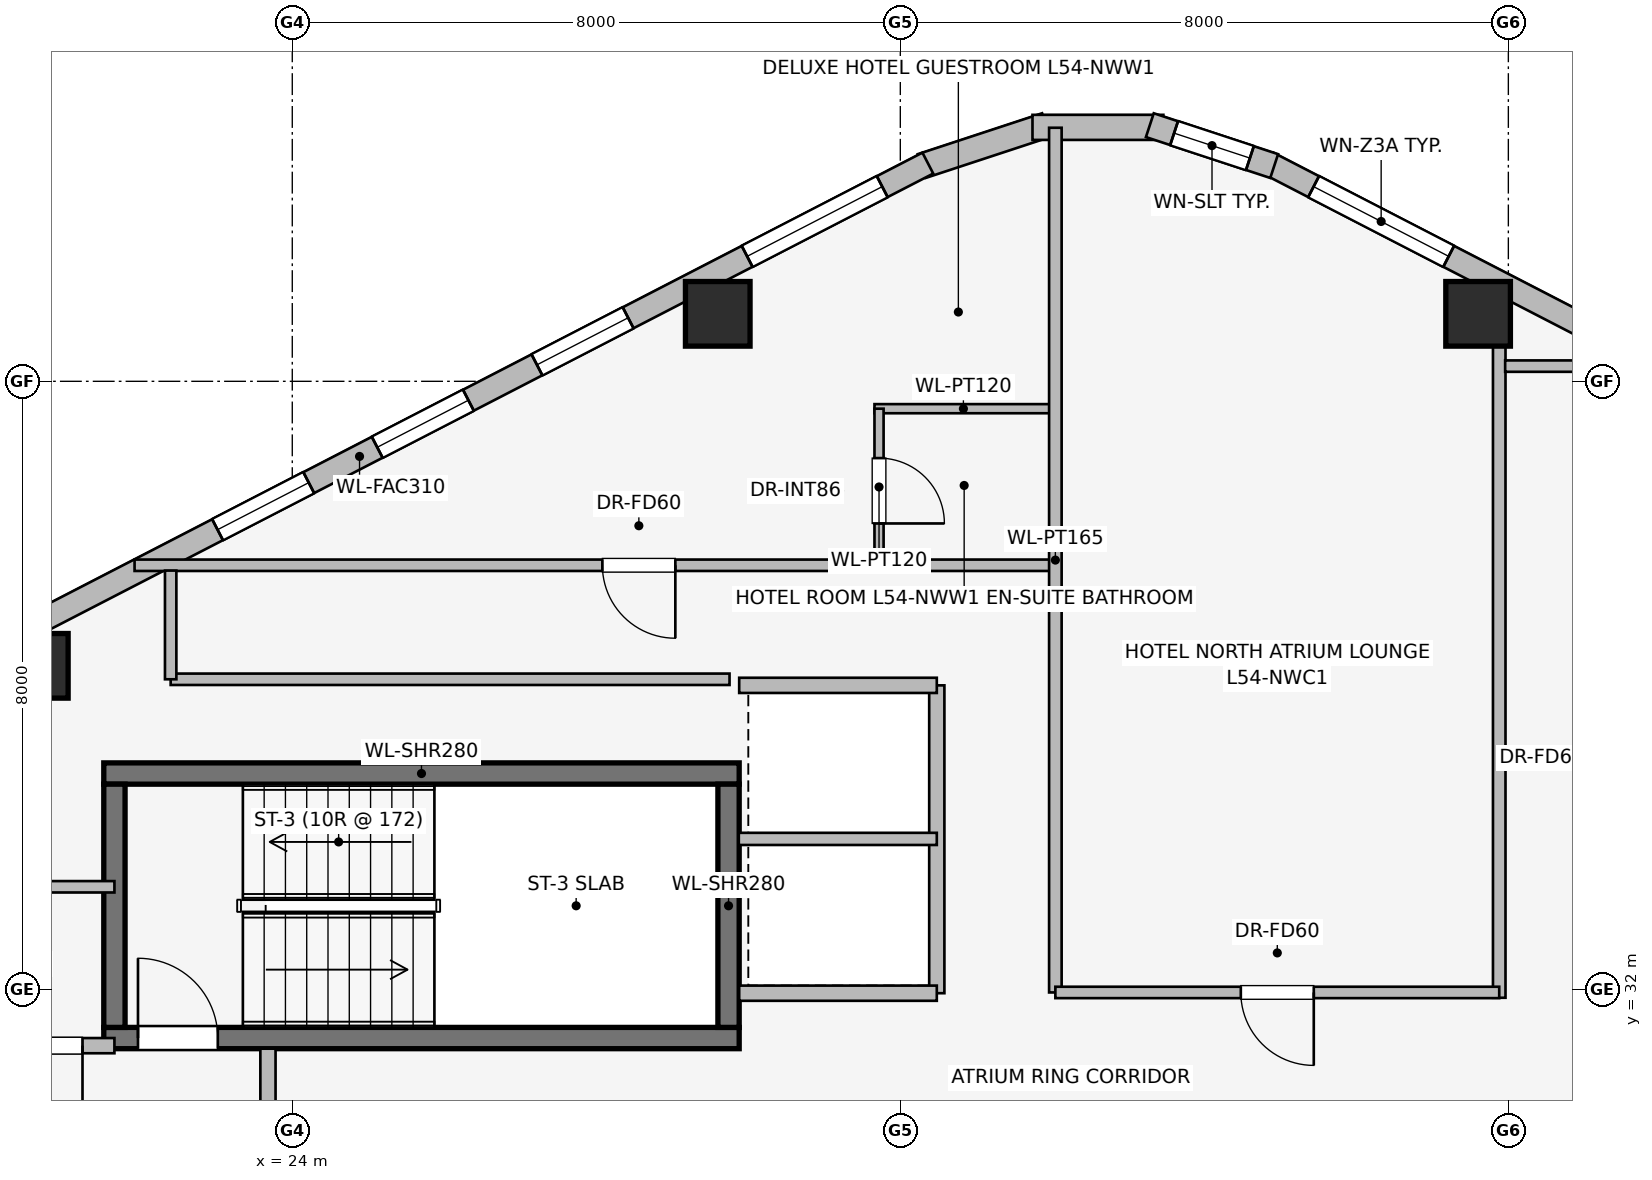
"""IFC4 building model, lengths in metres.
Left out: names, types, materials, properties, quantities, classifications, styles, units other than length and angle.
Written with IfcOpenShell. Run it as: python <this file> out.ifc"""

import sys

from ifc_helpers import new_model, si_unit, direction, frame, frame_2d, origin, origin_2d, place, context, subcontext, project, spatial, rectangle, extrude, element, fill, save


model = new_model("IFC4")
c1 = context("Model", 3, precision=1e-05, world=origin(), true_north=direction((0.0, 1.0)))
c2 = subcontext(c1, "Body", "Model", "MODEL_VIEW")
j1 = project(units=[si_unit("LENGTHUNIT", "METRE"), si_unit("PLANEANGLEUNIT", "RADIAN")], contexts=[c1])
p1 = place(None, origin())
s1 = spatial("IfcSite", under=j1, at=p1, CompositionType="ELEMENT")
p2 = place(p1, origin())
s2 = spatial("IfcBuilding", under=s1, at=p2, CompositionType="ELEMENT")
p3 = place(p2, frame((0.0, 0.0, 199.9)))
s3 = spatial("IfcBuildingStorey", under=s2, at=p3, CompositionType="ELEMENT", Elevation=199.9)
p4 = place(p3, frame((21.52, 31.36, 0.0), z_axis=(0.0, 0.0, 1.0), x_axis=(1.0, 0.0, 0.0)))
e1 = element("IfcWall", 1, at=p4, inside=s3, PredefinedType="SHEAR", context=c2, shape_type="SweptSolid", body=[
    extrude(rectangle(XDim=8.36, YDim=0.28, at=frame_2d((4.18, 0.0))), origin(), (0.0, 0.0, 1.0), 3.45),
])
p5 = place(p4, frame((0.45, 0.0, 0.0)))
e2 = element("IfcOpeningElement", 2, at=p5, cuts=e1, PredefinedType="OPENING", context=c2, shape_type="SweptSolid", body=[
    extrude(rectangle(XDim=1.05, YDim=2.0, at=frame_2d((0.525, 1.0))), frame((0.0, 0.15, 0.0), z_axis=(0.0, -1.0, 0.0), x_axis=(1.0, 0.0, 0.0)), (0.0, 0.0, 1.0), 0.3),
])
p6 = place(p3, frame((29.88, 34.84, 0.0), z_axis=(0.0, 0.0, 1.0), x_axis=(-1.0, 0.0, 0.0)))
e3 = element("IfcWall", 3, at=p6, inside=s3, PredefinedType="SHEAR", context=c2, shape_type="SweptSolid", body=[
    extrude(rectangle(XDim=8.36, YDim=0.28, at=frame_2d((4.18, 0.0))), origin(), (0.0, 0.0, 1.0), 3.45),
])
for number, where, z_axis, x_axis in (
    (4, (21.66, 34.7, 0.0), (0.0, 0.0, 1.0), (0.0, -1.0, 0.0)),
    (5, (29.74, 31.5, 0.0), (0.0, 0.0, 1.0), (0.0, 1.0, 0.0)),
):
    element("IfcWall", number, at=place(p3, frame(where, z_axis=z_axis, x_axis=x_axis)), inside=s3, PredefinedType="SHEAR", context=c2, shape_type="SweptSolid", body=[
        extrude(rectangle(XDim=3.2, YDim=0.28, at=frame_2d((1.6, 0.0))), origin(), (0.0, 0.0, 1.0), 3.45),
    ])
for number, where, z_axis, x_axis in (
    (6, (39.602, 40.888, 0.0), (0.0, 0.0, 1.0), (1.0, 0.0, 0.0)),
    (7, (29.598, 40.888, 0.0), (0.0, 0.0, 1.0), (1.0, 0.0, 0.0)),
    (8, (20.626, 36.257, 0.0), (0.0, 0.0, 1.0), (1.0, 0.0, 0.0)),
):
    element("IfcColumn", number, at=place(p3, frame(where, z_axis=z_axis, x_axis=x_axis)), inside=s3, PredefinedType="COLUMN", context=c2, shape_type="SweptSolid", body=[
        extrude(rectangle(XDim=0.85, YDim=0.85, at=origin_2d()), origin(), (0.0, 0.0, 1.0), 3.45),
    ])
p7 = place(p3, frame((36.838, 42.871, 0.0), z_axis=(0.0, 0.0, 1.0), x_axis=(0.888626188278, -0.458632202867, 0.0)))
e9 = element("IfcWall", 9, at=p7, inside=s3, PredefinedType="STANDARD", context=c2, shape_type="SweptSolid", body=[
    extrude(rectangle(XDim=16.828, YDim=0.31, at=frame_2d((8.414, 0.0))), origin(), (0.0, 0.0, 1.0), 3.19),
])
p8 = place(p7, frame((0.675, 0.0, 0.75)))
e10 = element("IfcOpeningElement", 10, at=p8, cuts=e9, PredefinedType="OPENING", context=c2, shape_type="SweptSolid", body=[
    extrude(rectangle(XDim=2.0, YDim=1.5, at=frame_2d((1.0, 0.75))), frame((0.0, 0.165, 0.0), z_axis=(0.0, -1.0, 0.0), x_axis=(1.0, 0.0, 0.0)), (0.0, 0.0, 1.0), 0.33),
])
p9 = place(p7, frame((6.273, 0.0, 0.75)))
e11 = element("IfcOpeningElement", 11, at=p9, cuts=e9, PredefinedType="OPENING", context=c2, shape_type="SweptSolid", body=[
    extrude(rectangle(XDim=1.35, YDim=1.45, at=frame_2d((0.675, 0.725))), frame((0.0, 0.165, 0.0), z_axis=(0.0, -1.0, 0.0), x_axis=(1.0, 0.0, 0.0)), (0.0, 0.0, 1.0), 0.33),
])
p10 = place(p7, frame((8.653, 0.0, 0.75)))
e12 = element("IfcOpeningElement", 12, at=p10, cuts=e9, PredefinedType="OPENING", context=c2, shape_type="SweptSolid", body=[
    extrude(rectangle(XDim=1.35, YDim=1.45, at=frame_2d((0.675, 0.725))), frame((0.0, 0.165, 0.0), z_axis=(0.0, -1.0, 0.0), x_axis=(1.0, 0.0, 0.0)), (0.0, 0.0, 1.0), 0.33),
])
p11 = place(p7, frame((11.032, 0.0, 0.75)))
e13 = element("IfcOpeningElement", 13, at=p11, cuts=e9, PredefinedType="OPENING", context=c2, shape_type="SweptSolid", body=[
    extrude(rectangle(XDim=1.35, YDim=1.45, at=frame_2d((0.675, 0.725))), frame((0.0, 0.165, 0.0), z_axis=(0.0, -1.0, 0.0), x_axis=(1.0, 0.0, 0.0)), (0.0, 0.0, 1.0), 0.33),
])
p12 = place(p7, frame((14.153, 0.0, 0.75)))
e14 = element("IfcOpeningElement", 14, at=p12, cuts=e9, PredefinedType="OPENING", context=c2, shape_type="SweptSolid", body=[
    extrude(rectangle(XDim=2.0, YDim=1.5, at=frame_2d((1.0, 0.75))), frame((0.0, 0.165, 0.0), z_axis=(0.0, -1.0, 0.0), x_axis=(1.0, 0.0, 0.0)), (0.0, 0.0, 1.0), 0.33),
])
p13 = place(p3, frame((32.281, 42.832, 0.0), z_axis=(0.0, 0.0, 1.0), x_axis=(0.949937416267, 0.312440242569, 0.0)))
e15 = element("IfcWall", 15, at=p13, inside=s3, PredefinedType="STANDARD", context=c2, shape_type="SweptSolid", body=[
    extrude(rectangle(XDim=1.722, YDim=0.33, at=frame_2d((0.861, 0.0))), origin(), (0.0, 0.0, 1.0), 3.19),
])
p14 = place(p3, frame((33.739, 43.341, 0.0), z_axis=(0.0, 0.0, 1.0), x_axis=(1.0, 0.0, 0.0)))
e16 = element("IfcWall", 16, at=p14, inside=s3, PredefinedType="STANDARD", context=c2, shape_type="SweptSolid", body=[
    extrude(rectangle(XDim=1.722, YDim=0.33, at=frame_2d((0.861, 0.0))), origin(), (0.0, 0.0, 1.0), 3.19),
])
p15 = place(p3, frame((35.283, 43.37, 0.0), z_axis=(0.0, 0.0, 1.0), x_axis=(0.949937416267, -0.312440242569, 0.0)))
e17 = element("IfcWall", 17, at=p15, inside=s3, PredefinedType="STANDARD", context=c2, shape_type="SweptSolid", body=[
    extrude(rectangle(XDim=1.722, YDim=0.33, at=frame_2d((0.861, 0.0))), origin(), (0.0, 0.0, 1.0), 3.19),
])
p16 = place(p15, frame((0.336, 0.0, 0.75)))
e18 = element("IfcOpeningElement", 18, at=p16, cuts=e17, PredefinedType="OPENING", context=c2, shape_type="SweptSolid", body=[
    extrude(rectangle(XDim=1.05, YDim=1.4, at=frame_2d((0.525, 0.7))), frame((0.0, 0.175, 0.0), z_axis=(0.0, -1.0, 0.0), x_axis=(1.0, 0.0, 0.0)), (0.0, 0.0, 1.0), 0.35),
])
p17 = place(p3, frame((17.408, 35.153, 0.0), z_axis=(0.0, 0.0, 1.0), x_axis=(0.888626188278, 0.458632202867, 0.0)))
e19 = element("IfcWall", 19, at=p17, inside=s3, PredefinedType="STANDARD", context=c2, shape_type="SweptSolid", body=[
    extrude(rectangle(XDim=16.828, YDim=0.31, at=frame_2d((8.414, 0.0))), origin(), (0.0, 0.0, 1.0), 2.494),
])
p18 = place(p17, frame((0.675, 0.0, 0.75)))
e20 = element("IfcOpeningElement", 20, at=p18, cuts=e19, PredefinedType="OPENING", context=c2, shape_type="SweptSolid", body=[
    extrude(rectangle(XDim=2.0, YDim=1.5, at=frame_2d((1.0, 0.75))), frame((0.0, 0.165, 0.0), z_axis=(0.0, -1.0, 0.0), x_axis=(1.0, 0.0, 0.0)), (0.0, 0.0, 1.0), 0.33),
])
p19 = place(p17, frame((6.312, 0.0, 0.75)))
e21 = element("IfcOpeningElement", 21, at=p19, cuts=e19, PredefinedType="OPENING", context=c2, shape_type="SweptSolid", body=[
    extrude(rectangle(XDim=1.35, YDim=1.45, at=frame_2d((0.675, 0.725))), frame((0.0, 0.165, 0.0), z_axis=(0.0, -1.0, 0.0), x_axis=(1.0, 0.0, 0.0)), (0.0, 0.0, 1.0), 0.33),
])
p20 = place(p17, frame((8.676, 0.0, 0.75)))
e22 = element("IfcOpeningElement", 22, at=p20, cuts=e19, PredefinedType="OPENING", context=c2, shape_type="SweptSolid", body=[
    extrude(rectangle(XDim=1.35, YDim=1.45, at=frame_2d((0.675, 0.725))), frame((0.0, 0.165, 0.0), z_axis=(0.0, -1.0, 0.0), x_axis=(1.0, 0.0, 0.0)), (0.0, 0.0, 1.0), 0.33),
])
p21 = place(p17, frame((11.041, 0.0, 0.75)))
e23 = element("IfcOpeningElement", 23, at=p21, cuts=e19, PredefinedType="OPENING", context=c2, shape_type="SweptSolid", body=[
    extrude(rectangle(XDim=1.35, YDim=1.45, at=frame_2d((0.675, 0.725))), frame((0.0, 0.165, 0.0), z_axis=(0.0, -1.0, 0.0), x_axis=(1.0, 0.0, 0.0)), (0.0, 0.0, 1.0), 0.33),
])
p22 = place(p17, frame((14.153, 0.0, 0.75)))
e24 = element("IfcOpeningElement", 24, at=p22, cuts=e19, PredefinedType="OPENING", context=c2, shape_type="SweptSolid", body=[
    extrude(rectangle(XDim=2.0, YDim=1.5, at=frame_2d((1.0, 0.75))), frame((0.0, 0.165, 0.0), z_axis=(0.0, -1.0, 0.0), x_axis=(1.0, 0.0, 0.0)), (0.0, 0.0, 1.0), 0.33),
])
p23 = place(p3, frame((23.68, 25.68, 0.0), z_axis=(0.0, 0.0, 1.0), x_axis=(0.0, 1.0, 0.0)))
e25 = element("IfcWall", 25, at=p23, inside=s3, PredefinedType="PARTITIONING", context=c2, shape_type="SweptSolid", body=[
    extrude(rectangle(XDim=5.54, YDim=0.2, at=frame_2d((2.77, 0.0))), origin(), (0.0, 0.0, 1.0), 3.19),
])
p24 = place(p23, frame((1.8, 0.0, 0.0)))
e26 = element("IfcOpeningElement", 26, at=p24, cuts=e25, PredefinedType="OPENING", context=c2, shape_type="SweptSolid", body=[
    extrude(rectangle(XDim=1.05, YDim=2.0, at=frame_2d((0.525, 1.0))), frame((0.0, 0.11, 0.0), z_axis=(0.0, -1.0, 0.0), x_axis=(1.0, 0.0, 0.0)), (0.0, 0.0, 1.0), 0.22),
])
p25 = place(p3, frame((21.66, 31.26, 0.0), z_axis=(0.0, 0.0, 1.0), x_axis=(-1.0, 0.0, 0.0)))
e27 = element("IfcWall", 27, at=p25, inside=s3, PredefinedType="PARTITIONING", context=c2, shape_type="SweptSolid", body=[
    extrude(rectangle(XDim=2.01, YDim=0.2, at=frame_2d((1.005, 0.0))), origin(), (0.0, 0.0, 1.0), 3.19),
])
p26 = place(p25, frame((0.42, 0.0, 0.0)))
e28 = element("IfcOpeningElement", 28, at=p26, cuts=e27, PredefinedType="OPENING", context=c2, shape_type="SweptSolid", body=[
    extrude(rectangle(XDim=0.86, YDim=2.0, at=frame_2d((0.43, 1.0))), frame((0.0, 0.11, 0.0), z_axis=(0.0, -1.0, 0.0), x_axis=(1.0, 0.0, 0.0)), (0.0, 0.0, 1.0), 0.22),
])
p27 = place(p3, frame((32.48, 31.95, 0.0), z_axis=(0.0, 0.0, 1.0), x_axis=(0.0, 1.0, 0.0)))
e29 = element("IfcWall", 29, at=p27, inside=s3, PredefinedType="PARTITIONING", context=c2, shape_type="SweptSolid", body=[
    extrude(rectangle(XDim=4.05, YDim=0.2, at=frame_2d((2.025, 0.0))), origin(), (0.0, 0.0, 1.0), 3.19),
])
for number, where, z_axis, x_axis in (
    (30, (29.88, 36.0, 0.0), (0.0, 0.0, 1.0), (1.0, 0.0, 0.0)),
    (31, (32.48, 31.95, 0.0), (0.0, 0.0, 1.0), (-1.0, 0.0, 0.0)),
):
    element("IfcWall", number, at=place(p3, frame(where, z_axis=z_axis, x_axis=x_axis)), inside=s3, PredefinedType="PARTITIONING", context=c2, shape_type="SweptSolid", body=[
        extrude(rectangle(XDim=2.6, YDim=0.2, at=frame_2d((1.3, 0.0))), origin(), (0.0, 0.0, 1.0), 3.19),
    ])
p28 = place(p3, frame((29.875, 33.98, 0.0), z_axis=(0.0, 0.0, 1.0), x_axis=(1.0, 0.0, 0.0)))
e32 = element("IfcWall", 32, at=p28, inside=s3, PredefinedType="PARTITIONING", context=c2, shape_type="SweptSolid", body=[
    extrude(rectangle(XDim=2.605, YDim=0.16, at=frame_2d((1.302, 0.0))), origin(), (0.0, 0.0, 1.0), 2.582),
])
p29 = place(p3, frame((21.66, 33.35, 0.0), z_axis=(0.0, 0.0, 1.0), x_axis=(-1.0, 0.0, 0.0)))
e33 = element("IfcWall", 33, at=p29, inside=s3, PredefinedType="PARTITIONING", context=c2, shape_type="SweptSolid", body=[
    extrude(rectangle(XDim=2.56, YDim=0.15, at=frame_2d((1.28, 0.0))), origin(), (0.0, 0.0, 1.0), 3.19),
])
p30 = place(p3, frame((34.0, 39.64, 0.0), z_axis=(0.0, 0.0, 1.0), x_axis=(-1.0, 0.0, 0.0)))
e34 = element("IfcWall", 34, at=p30, inside=s3, PredefinedType="PARTITIONING", context=c2, shape_type="SweptSolid", body=[
    extrude(rectangle(XDim=2.34, YDim=0.12, at=frame_2d((1.17, 0.0))), origin(), (0.0, 0.0, 1.0), 3.19),
])
p31 = place(p3, frame((31.72, 39.64, 0.0), z_axis=(0.0, 0.0, 1.0), x_axis=(0.0, -1.0, 0.0)))
e35 = element("IfcWall", 35, at=p31, inside=s3, PredefinedType="PARTITIONING", context=c2, shape_type="SweptSolid", body=[
    extrude(rectangle(XDim=2.06, YDim=0.12, at=frame_2d((1.03, 0.0))), origin(), (0.0, 0.0, 1.0), 3.19),
])
p32 = place(p31, frame((0.65, 0.0, 0.0)))
e36 = element("IfcOpeningElement", 36, at=p32, cuts=e35, PredefinedType="OPENING", context=c2, shape_type="SweptSolid", body=[
    extrude(rectangle(XDim=0.86, YDim=2.0, at=frame_2d((0.43, 1.0))), frame((0.0, 0.07, 0.0), z_axis=(0.0, -1.0, 0.0), x_axis=(1.0, 0.0, 0.0)), (0.0, 0.0, 1.0), 0.14),
])
p33 = place(p3, frame((34.0, 37.58, 0.0), z_axis=(0.0, 0.0, 1.0), x_axis=(-1.0, 0.0, 0.0)))
e37 = element("IfcWall", 37, at=p33, inside=s3, PredefinedType="PARTITIONING", context=c2, shape_type="SweptSolid", body=[
    extrude(rectangle(XDim=12.075, YDim=0.15, at=frame_2d((6.038, 0.0))), origin(), (0.0, 0.0, 1.0), 2.582),
])
p34 = place(p33, frame((4.96, 0.0, 0.0)))
e38 = element("IfcOpeningElement", 38, at=p34, cuts=e37, PredefinedType="OPENING", context=c2, shape_type="SweptSolid", body=[
    extrude(rectangle(XDim=0.96, YDim=2.0, at=frame_2d((0.48, 1.0))), frame((0.0, 0.085, 0.0), z_axis=(0.0, -1.0, 0.0), x_axis=(1.0, 0.0, 0.0)), (0.0, 0.0, 1.0), 0.17),
])
p35 = place(p3, frame((34.04, 31.96, 0.0), z_axis=(0.0, 0.0, 1.0), x_axis=(0.0, 1.0, 0.0)))
e39 = element("IfcWall", 39, at=p35, inside=s3, PredefinedType="PARTITIONING", context=c2, shape_type="SweptSolid", body=[
    extrude(rectangle(XDim=11.376, YDim=0.165, at=frame_2d((5.688, 0.0))), origin(), (0.0, 0.0, 1.0), 3.19),
])
p36 = place(p3, frame((39.88, 31.89, 0.0), z_axis=(0.0, 0.0, 1.0), x_axis=(0.0, 1.0, 0.0)))
e40 = element("IfcWall", 40, at=p36, inside=s3, PredefinedType="PARTITIONING", context=c2, shape_type="SweptSolid", body=[
    extrude(rectangle(XDim=9.406, YDim=0.165, at=frame_2d((4.703, 0.0))), origin(), (0.0, 0.0, 1.0), 2.497),
])
p37 = place(p3, frame((39.88, 31.96, 0.0), z_axis=(0.0, 0.0, 1.0), x_axis=(-1.0, 0.0, 0.0)))
e41 = element("IfcWall", 41, at=p37, inside=s3, PredefinedType="PARTITIONING", context=c2, shape_type="SweptSolid", body=[
    extrude(rectangle(XDim=5.84, YDim=0.15, at=frame_2d((2.92, 0.0))), origin(), (0.0, 0.0, 1.0), 3.19),
])
p38 = place(p37, frame((2.44, 0.0, 0.0)))
e42 = element("IfcOpeningElement", 42, at=p38, cuts=e41, PredefinedType="OPENING", context=c2, shape_type="SweptSolid", body=[
    extrude(rectangle(XDim=0.96, YDim=2.0, at=frame_2d((0.48, 1.0))), frame((0.0, 0.085, 0.0), z_axis=(0.0, -1.0, 0.0), x_axis=(1.0, 0.0, 0.0)), (0.0, 0.0, 1.0), 0.17),
])
p39 = place(p3, frame((29.753, 36.08, 0.0), z_axis=(0.0, 0.0, 1.0), x_axis=(-1.0, 0.0, 0.0)))
e43 = element("IfcWall", 43, at=p39, inside=s3, PredefinedType="PARTITIONING", context=c2, shape_type="SweptSolid", body=[
    extrude(rectangle(XDim=7.353, YDim=0.15, at=frame_2d((3.677, 0.0))), origin(), (0.0, 0.0, 1.0), 3.19),
])
p40 = place(p3, frame((22.4, 36.08, 0.0), z_axis=(0.0, 0.0, 1.0), x_axis=(0.0, 1.0, 0.0)))
e44 = element("IfcWall", 44, at=p40, inside=s3, PredefinedType="PARTITIONING", context=c2, shape_type="SweptSolid", body=[
    extrude(rectangle(XDim=1.43, YDim=0.15, at=frame_2d((0.715, 0.0))), origin(), (0.0, 0.0, 1.0), 3.19),
])
p41 = place(p3, frame((39.958, 40.2, 0.0), z_axis=(0.0, 0.0, 1.0), x_axis=(1.0, 0.0, 0.0)))
e45 = element("IfcWall", 45, at=p41, inside=s3, PredefinedType="PARTITIONING", context=c2, shape_type="SweptSolid", body=[
    extrude(rectangle(XDim=1.512, YDim=0.15, at=frame_2d((0.756, 0.0))), origin(), (0.0, 0.0, 1.0), 3.19),
])
p42 = place(p8, origin())
e46 = element("IfcWindow", 46, at=p42, inside=s3, PartitioningType="SINGLE_PANEL", PredefinedType="WINDOW", context=c2, shape_type="SweptSolid", body=[
    extrude(rectangle(XDim=2.0, YDim=1.5, at=frame_2d((1.0, 0.75))), frame((0.0, 0.03, 0.0), z_axis=(0.0, -1.0, 0.0), x_axis=(1.0, 0.0, 0.0)), (0.0, 0.0, 1.0), 0.06),
])
fill(e10, e46)
p43 = place(p16, origin())
e47 = element("IfcWindow", 47, at=p43, inside=s3, PartitioningType="SINGLE_PANEL", PredefinedType="WINDOW", context=c2, shape_type="SweptSolid", body=[
    extrude(rectangle(XDim=1.05, YDim=1.4, at=frame_2d((0.525, 0.7))), frame((0.0, 0.03, 0.0), z_axis=(0.0, -1.0, 0.0), x_axis=(1.0, 0.0, 0.0)), (0.0, 0.0, 1.0), 0.06),
])
fill(e18, e47)
p44 = place(p19, origin())
e48 = element("IfcWindow", 48, at=p44, inside=s3, PartitioningType="SINGLE_PANEL", PredefinedType="WINDOW", context=c2, shape_type="SweptSolid", body=[
    extrude(rectangle(XDim=1.35, YDim=1.45, at=frame_2d((0.675, 0.725))), frame((0.0, 0.03, 0.0), z_axis=(0.0, -1.0, 0.0), x_axis=(1.0, 0.0, 0.0)), (0.0, 0.0, 1.0), 0.06),
])
fill(e21, e48)
p45 = place(p20, origin())
e49 = element("IfcWindow", 49, at=p45, inside=s3, PartitioningType="SINGLE_PANEL", PredefinedType="WINDOW", context=c2, shape_type="SweptSolid", body=[
    extrude(rectangle(XDim=1.35, YDim=1.45, at=frame_2d((0.675, 0.725))), frame((0.0, 0.03, 0.0), z_axis=(0.0, -1.0, 0.0), x_axis=(1.0, 0.0, 0.0)), (0.0, 0.0, 1.0), 0.06),
])
fill(e22, e49)
p46 = place(p21, origin())
e50 = element("IfcWindow", 50, at=p46, inside=s3, PartitioningType="SINGLE_PANEL", PredefinedType="WINDOW", context=c2, shape_type="SweptSolid", body=[
    extrude(rectangle(XDim=1.35, YDim=1.45, at=frame_2d((0.675, 0.725))), frame((0.0, 0.03, 0.0), z_axis=(0.0, -1.0, 0.0), x_axis=(1.0, 0.0, 0.0)), (0.0, 0.0, 1.0), 0.06),
])
fill(e23, e50)
p47 = place(p22, origin())
e51 = element("IfcWindow", 51, at=p47, inside=s3, PartitioningType="SINGLE_PANEL", PredefinedType="WINDOW", context=c2, shape_type="SweptSolid", body=[
    extrude(rectangle(XDim=2.0, YDim=1.5, at=frame_2d((1.0, 0.75))), frame((0.0, 0.03, 0.0), z_axis=(0.0, -1.0, 0.0), x_axis=(1.0, 0.0, 0.0)), (0.0, 0.0, 1.0), 0.06),
])
fill(e24, e51)
p48 = place(p5, origin())
e52 = element("IfcDoor", 52, at=p48, inside=s3, OperationType="SINGLE_SWING_LEFT", PredefinedType="DOOR", context=c2, shape_type="SweptSolid", body=[
    extrude(rectangle(XDim=1.05, YDim=2.0, at=frame_2d((0.525, 1.0))), frame((0.0, 0.025, 0.0), z_axis=(0.0, -1.0, 0.0), x_axis=(1.0, 0.0, 0.0)), (0.0, 0.0, 1.0), 0.05),
])
fill(e2, e52)
p49 = place(p26, origin())
e53 = element("IfcDoor", 53, at=p49, inside=s3, OperationType="SINGLE_SWING_LEFT", PredefinedType="DOOR", context=c2, shape_type="SweptSolid", body=[
    extrude(rectangle(XDim=0.86, YDim=2.0, at=frame_2d((0.43, 1.0))), frame((0.0, 0.025, 0.0), z_axis=(0.0, -1.0, 0.0), x_axis=(1.0, 0.0, 0.0)), (0.0, 0.0, 1.0), 0.05),
])
fill(e28, e53)
p50 = place(p32, origin())
e54 = element("IfcDoor", 54, at=p50, inside=s3, OperationType="SINGLE_SWING_RIGHT", PredefinedType="DOOR", context=c2, shape_type="SweptSolid", body=[
    extrude(rectangle(XDim=0.86, YDim=2.0, at=frame_2d((0.43, 1.0))), frame((0.0, 0.025, 0.0), z_axis=(0.0, -1.0, 0.0), x_axis=(1.0, 0.0, 0.0)), (0.0, 0.0, 1.0), 0.05),
])
fill(e36, e54)
p51 = place(p34, origin())
e55 = element("IfcDoor", 55, at=p51, inside=s3, OperationType="SINGLE_SWING_LEFT", PredefinedType="DOOR", context=c2, shape_type="SweptSolid", body=[
    extrude(rectangle(XDim=0.96, YDim=2.0, at=frame_2d((0.48, 1.0))), frame((0.0, 0.025, 0.0), z_axis=(0.0, -1.0, 0.0), x_axis=(1.0, 0.0, 0.0)), (0.0, 0.0, 1.0), 0.05),
])
fill(e38, e55)
p52 = place(p38, origin())
e56 = element("IfcDoor", 56, at=p52, inside=s3, OperationType="SINGLE_SWING_LEFT", PredefinedType="DOOR", context=c2, shape_type="SweptSolid", body=[
    extrude(rectangle(XDim=0.96, YDim=2.0, at=frame_2d((0.48, 1.0))), frame((0.0, 0.025, 0.0), z_axis=(0.0, -1.0, 0.0), x_axis=(1.0, 0.0, 0.0)), (0.0, 0.0, 1.0), 0.05),
])
fill(e42, e56)
save(model, sys.argv[1])
